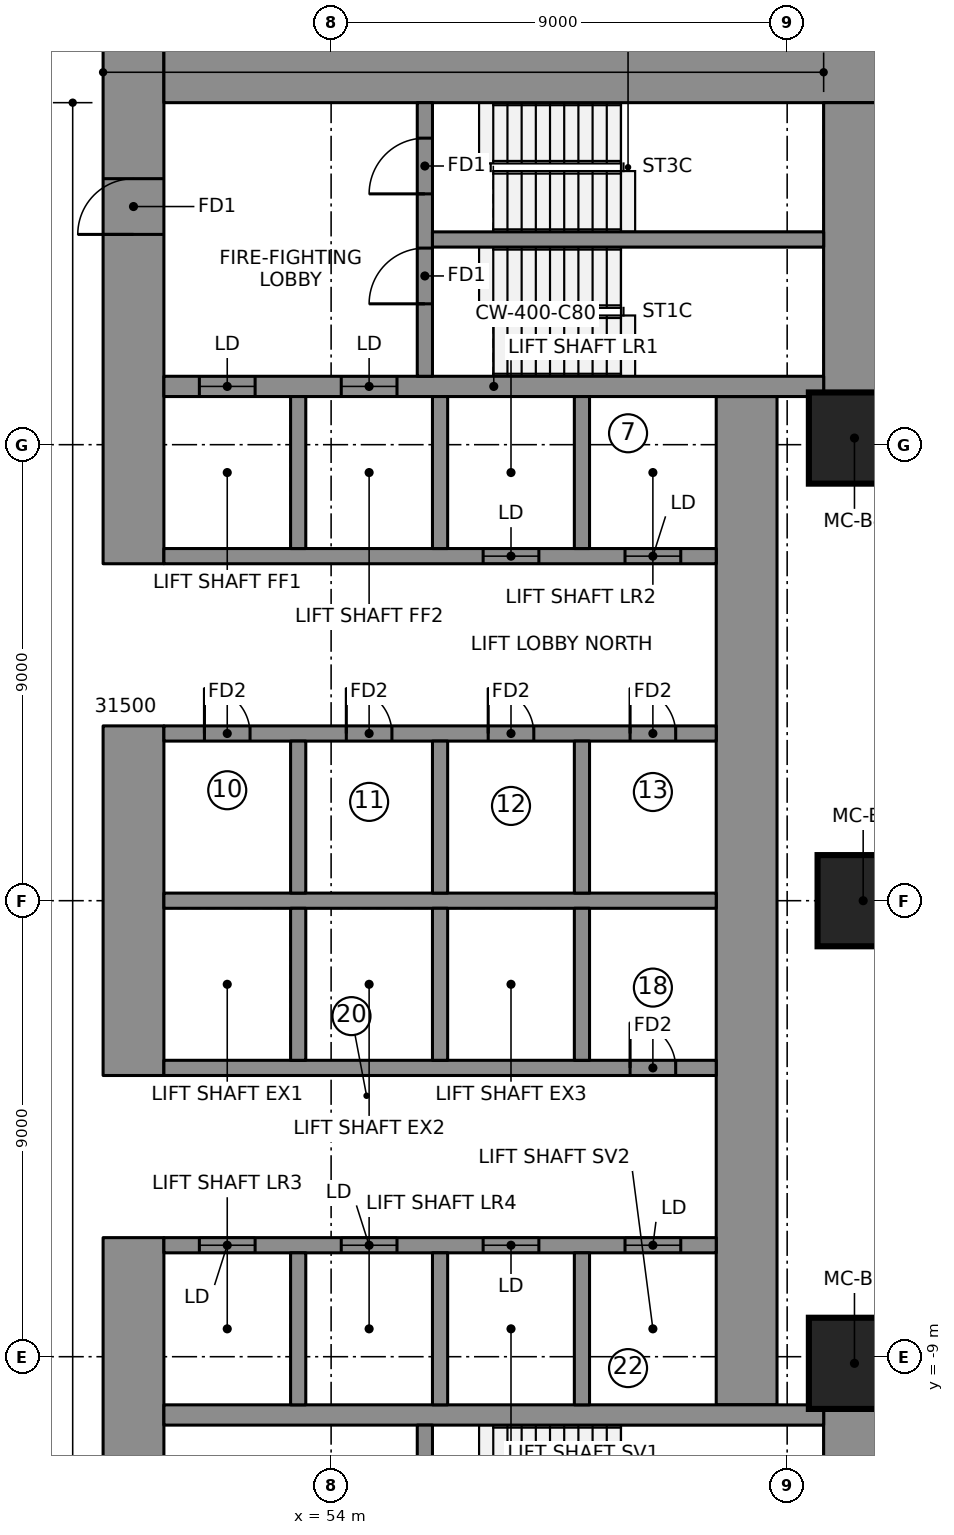
"""IFC4 building model, lengths in metres.
Left out: names, types, materials, properties, quantities, classifications, styles, units other than length and angle.
Written with IfcOpenShell. Run it as: python <this file> out.ifc"""

import sys

from ifc_helpers import new_model, si_unit, direction, frame, frame_2d, origin, origin_2d, place, context, subcontext, project, spatial, rectangle, extrude, element, fill, save


model = new_model("IFC4")
c1 = context("Model", 3, precision=1e-05, world=origin(), true_north=direction((0.0, 1.0)))
c2 = subcontext(c1, "Body", "Model", "MODEL_VIEW")
j1 = project(units=[si_unit("LENGTHUNIT", "METRE"), si_unit("PLANEANGLEUNIT", "RADIAN")], contexts=[c1])
p1 = place(None, origin())
s1 = spatial("IfcSite", under=j1, at=p1, CompositionType="ELEMENT")
p2 = place(p1, origin())
s2 = spatial("IfcBuilding", under=s1, at=p2, CompositionType="ELEMENT")
p3 = place(p2, frame((0.0, 0.0, 57.35)))
s3 = spatial("IfcBuildingStorey", under=s2, at=p3, CompositionType="ELEMENT", Elevation=57.35)
p4 = place(p3, frame((50.1, 6.65, 0.0), z_axis=(0.0, 0.0, 1.0), x_axis=(0.0, 1.0, 0.0)))
e1 = element("IfcWall", 1, at=p4, inside=s3, PredefinedType="SHEAR", context=c2, shape_type="SweptSolid", body=[
    extrude(rectangle(XDim=10.3, YDim=1.2, at=frame_2d((5.15, 0.0))), origin(), (0.0, 0.0, 1.0), 3.55),
])
p5 = place(p4, frame((6.5, 0.0, 0.0)))
e2 = element("IfcOpeningElement", 2, at=p5, cuts=e1, PredefinedType="OPENING", context=c2, shape_type="SweptSolid", body=[
    extrude(rectangle(XDim=1.1, YDim=2.1, at=frame_2d((0.55, 1.05))), frame((0.0, 0.61, 0.0), z_axis=(0.0, -1.0, 0.0), x_axis=(1.0, 0.0, 0.0)), (0.0, 0.0, 1.0), 1.22),
])
p6 = place(p3, frame((50.1, -3.45, 0.0), z_axis=(0.0, 0.0, 1.0), x_axis=(0.0, 1.0, 0.0)))
e3 = element("IfcWall", 3, at=p6, inside=s3, PredefinedType="SHEAR", context=c2, shape_type="SweptSolid", body=[
    extrude(rectangle(XDim=6.9, YDim=1.2, at=frame_2d((3.45, 0.0))), origin(), (0.0, 0.0, 1.0), 3.55),
])
p7 = place(p3, frame((50.1, -16.95, 0.0), z_axis=(0.0, 0.0, 1.0), x_axis=(0.0, 1.0, 0.0)))
e4 = element("IfcWall", 4, at=p7, inside=s3, PredefinedType="SHEAR", context=c2, shape_type="SweptSolid", body=[
    extrude(rectangle(XDim=10.3, YDim=1.2, at=frame_2d((5.15, 0.0))), origin(), (0.0, 0.0, 1.0), 3.55),
])
p8 = place(p7, frame((2.7, 0.0, 0.0)))
e5 = element("IfcOpeningElement", 5, at=p8, cuts=e4, PredefinedType="OPENING", context=c2, shape_type="SweptSolid", body=[
    extrude(rectangle(XDim=1.1, YDim=2.1, at=frame_2d((0.55, 1.05))), frame((0.0, 0.61, 0.0), z_axis=(0.0, -1.0, 0.0), x_axis=(1.0, 0.0, 0.0)), (0.0, 0.0, 1.0), 1.22),
])
p9 = place(p3, frame((50.7, 16.35, 0.0), z_axis=(0.0, 0.0, 1.0), x_axis=(1.0, 0.0, 0.0)))
e6 = element("IfcWall", 6, at=p9, inside=s3, PredefinedType="SHEAR", context=c2, shape_type="SweptSolid", body=[
    extrude(rectangle(XDim=14.22, YDim=1.2, at=frame_2d((7.11, 0.0))), origin(), (0.0, 0.0, 1.0), 3.55),
])
for number, where, z_axis, x_axis in (
    (7, (64.32, 9.95, 0.0), (0.0, 0.0, 1.0), (0.0, 1.0, 0.0)),
    (8, (64.32, -15.75, 0.0), (0.0, 0.0, 1.0), (0.0, 1.0, 0.0)),
):
    element("IfcWall", number, at=place(p3, frame(where, z_axis=z_axis, x_axis=x_axis)), inside=s3, PredefinedType="SHEAR", context=c2, shape_type="SweptSolid", body=[
        extrude(rectangle(XDim=5.8, YDim=1.2, at=frame_2d((2.9, 0.0))), origin(), (0.0, 0.0, 1.0), 3.55),
    ])
p10 = place(p3, frame((62.2, -9.95, 0.0), z_axis=(0.0, 0.0, 1.0), x_axis=(0.0, 1.0, 0.0)))
e9 = element("IfcWall", 9, at=p10, inside=s3, PredefinedType="SHEAR", context=c2, shape_type="SweptSolid", body=[
    extrude(rectangle(XDim=19.9, YDim=1.2, at=frame_2d((9.95, 0.0))), origin(), (0.0, 0.0, 1.0), 3.55),
])
p11 = place(p3, frame((50.7, 10.15, 0.0), z_axis=(0.0, 0.0, 1.0), x_axis=(1.0, 0.0, 0.0)))
e10 = element("IfcWall", 10, at=p11, inside=s3, PredefinedType="SHEAR", context=c2, shape_type="SweptSolid", body=[
    extrude(rectangle(XDim=13.02, YDim=0.4, at=frame_2d((6.51, 0.0))), origin(), (0.0, 0.0, 1.0), 3.55),
])
p12 = place(p11, frame((0.7, 0.0, 0.0)))
e11 = element("IfcOpeningElement", 11, at=p12, cuts=e10, PredefinedType="OPENING", context=c2, shape_type="SweptSolid", body=[
    extrude(rectangle(XDim=1.1, YDim=2.1, at=frame_2d((0.55, 1.05))), frame((0.0, 0.21, 0.0), z_axis=(0.0, -1.0, 0.0), x_axis=(1.0, 0.0, 0.0)), (0.0, 0.0, 1.0), 0.42),
])
p13 = place(p11, frame((3.5, 0.0, 0.0)))
e12 = element("IfcOpeningElement", 12, at=p13, cuts=e10, PredefinedType="OPENING", context=c2, shape_type="SweptSolid", body=[
    extrude(rectangle(XDim=1.1, YDim=2.1, at=frame_2d((0.55, 1.05))), frame((0.0, 0.21, 0.0), z_axis=(0.0, -1.0, 0.0), x_axis=(1.0, 0.0, 0.0)), (0.0, 0.0, 1.0), 0.42),
])
p14 = place(p3, frame((50.7, -10.15, 0.0), z_axis=(0.0, 0.0, 1.0), x_axis=(1.0, 0.0, 0.0)))
e13 = element("IfcWall", 13, at=p14, inside=s3, PredefinedType="SHEAR", context=c2, shape_type="SweptSolid", body=[
    extrude(rectangle(XDim=13.02, YDim=0.4, at=frame_2d((6.51, 0.0))), origin(), (0.0, 0.0, 1.0), 3.55),
])
p15 = place(p3, frame((50.7, 0.0, 0.0), z_axis=(0.0, 0.0, 1.0), x_axis=(1.0, 0.0, 0.0)))
e14 = element("IfcWall", 14, at=p15, inside=s3, PredefinedType="SHEAR", context=c2, shape_type="SweptSolid", body=[
    extrude(rectangle(XDim=10.9, YDim=0.3, at=frame_2d((5.45, 0.0))), origin(), (0.0, 0.0, 1.0), 3.55),
])
p16 = place(p3, frame((50.7, 3.3, 0.0), z_axis=(0.0, 0.0, 1.0), x_axis=(1.0, 0.0, 0.0)))
e15 = element("IfcWall", 15, at=p16, inside=s3, PredefinedType="SHEAR", context=c2, shape_type="SweptSolid", body=[
    extrude(rectangle(XDim=10.9, YDim=0.3, at=frame_2d((5.45, 0.0))), origin(), (0.0, 0.0, 1.0), 3.55),
])
p17 = place(p16, frame((0.8, 0.0, 0.0)))
e16 = element("IfcOpeningElement", 16, at=p17, cuts=e15, PredefinedType="OPENING", context=c2, shape_type="SweptSolid", body=[
    extrude(rectangle(XDim=0.9, YDim=2.1, at=frame_2d((0.45, 1.05))), frame((0.0, 0.16, 0.0), z_axis=(0.0, -1.0, 0.0), x_axis=(1.0, 0.0, 0.0)), (0.0, 0.0, 1.0), 0.32),
])
p18 = place(p16, frame((3.6, 0.0, 0.0)))
e17 = element("IfcOpeningElement", 17, at=p18, cuts=e15, PredefinedType="OPENING", context=c2, shape_type="SweptSolid", body=[
    extrude(rectangle(XDim=0.9, YDim=2.1, at=frame_2d((0.45, 1.05))), frame((0.0, 0.16, 0.0), z_axis=(0.0, -1.0, 0.0), x_axis=(1.0, 0.0, 0.0)), (0.0, 0.0, 1.0), 0.32),
])
p19 = place(p16, frame((6.4, 0.0, 0.0)))
e18 = element("IfcOpeningElement", 18, at=p19, cuts=e15, PredefinedType="OPENING", context=c2, shape_type="SweptSolid", body=[
    extrude(rectangle(XDim=0.9, YDim=2.1, at=frame_2d((0.45, 1.05))), frame((0.0, 0.16, 0.0), z_axis=(0.0, -1.0, 0.0), x_axis=(1.0, 0.0, 0.0)), (0.0, 0.0, 1.0), 0.32),
])
p20 = place(p16, frame((9.2, 0.0, 0.0)))
e19 = element("IfcOpeningElement", 19, at=p20, cuts=e15, PredefinedType="OPENING", context=c2, shape_type="SweptSolid", body=[
    extrude(rectangle(XDim=0.9, YDim=2.1, at=frame_2d((0.45, 1.05))), frame((0.0, 0.16, 0.0), z_axis=(0.0, -1.0, 0.0), x_axis=(1.0, 0.0, 0.0)), (0.0, 0.0, 1.0), 0.32),
])
p21 = place(p3, frame((50.7, 6.8, 0.0), z_axis=(0.0, 0.0, 1.0), x_axis=(1.0, 0.0, 0.0)))
e20 = element("IfcWall", 20, at=p21, inside=s3, PredefinedType="SHEAR", context=c2, shape_type="SweptSolid", body=[
    extrude(rectangle(XDim=10.9, YDim=0.3, at=frame_2d((5.45, 0.0))), origin(), (0.0, 0.0, 1.0), 3.55),
])
p22 = place(p21, frame((6.3, 0.0, 0.0)))
e21 = element("IfcOpeningElement", 21, at=p22, cuts=e20, PredefinedType="OPENING", context=c2, shape_type="SweptSolid", body=[
    extrude(rectangle(XDim=1.1, YDim=2.1, at=frame_2d((0.55, 1.05))), frame((0.0, 0.16, 0.0), z_axis=(0.0, -1.0, 0.0), x_axis=(1.0, 0.0, 0.0)), (0.0, 0.0, 1.0), 0.32),
])
p23 = place(p21, frame((9.1, 0.0, 0.0)))
e22 = element("IfcOpeningElement", 22, at=p23, cuts=e20, PredefinedType="OPENING", context=c2, shape_type="SweptSolid", body=[
    extrude(rectangle(XDim=1.1, YDim=2.1, at=frame_2d((0.55, 1.05))), frame((0.0, 0.16, 0.0), z_axis=(0.0, -1.0, 0.0), x_axis=(1.0, 0.0, 0.0)), (0.0, 0.0, 1.0), 0.32),
])
for number, where, z_axis, x_axis in (
    (23, (53.35, 0.15, 0.0), (0.0, 0.0, 1.0), (0.0, 1.0, 0.0)),
    (24, (53.35, 6.95, 0.0), (0.0, 0.0, 1.0), (0.0, 1.0, 0.0)),
    (25, (56.15, 0.15, 0.0), (0.0, 0.0, 1.0), (0.0, 1.0, 0.0)),
    (26, (56.15, 6.95, 0.0), (0.0, 0.0, 1.0), (0.0, 1.0, 0.0)),
    (27, (58.95, 0.15, 0.0), (0.0, 0.0, 1.0), (0.0, 1.0, 0.0)),
    (28, (58.95, 6.95, 0.0), (0.0, 0.0, 1.0), (0.0, 1.0, 0.0)),
):
    element("IfcWall", number, at=place(p3, frame(where, z_axis=z_axis, x_axis=x_axis)), inside=s3, PredefinedType="SHEAR", context=c2, shape_type="SweptSolid", body=[
        extrude(rectangle(XDim=3.0, YDim=0.3, at=frame_2d((1.5, 0.0))), origin(), (0.0, 0.0, 1.0), 3.55),
    ])
p24 = place(p3, frame((50.7, -3.3, 0.0), z_axis=(0.0, 0.0, 1.0), x_axis=(1.0, 0.0, 0.0)))
e29 = element("IfcWall", 29, at=p24, inside=s3, PredefinedType="SHEAR", context=c2, shape_type="SweptSolid", body=[
    extrude(rectangle(XDim=10.9, YDim=0.3, at=frame_2d((5.45, 0.0))), origin(), (0.0, 0.0, 1.0), 3.55),
])
p25 = place(p24, frame((9.2, 0.0, 0.0)))
e30 = element("IfcOpeningElement", 30, at=p25, cuts=e29, PredefinedType="OPENING", context=c2, shape_type="SweptSolid", body=[
    extrude(rectangle(XDim=0.9, YDim=2.1, at=frame_2d((0.45, 1.05))), frame((0.0, 0.16, 0.0), z_axis=(0.0, -1.0, 0.0), x_axis=(1.0, 0.0, 0.0)), (0.0, 0.0, 1.0), 0.32),
])
p26 = place(p3, frame((50.7, -6.8, 0.0), z_axis=(0.0, 0.0, 1.0), x_axis=(1.0, 0.0, 0.0)))
e31 = element("IfcWall", 31, at=p26, inside=s3, PredefinedType="SHEAR", context=c2, shape_type="SweptSolid", body=[
    extrude(rectangle(XDim=10.9, YDim=0.3, at=frame_2d((5.45, 0.0))), origin(), (0.0, 0.0, 1.0), 3.55),
])
p27 = place(p26, frame((0.7, 0.0, 0.0)))
e32 = element("IfcOpeningElement", 32, at=p27, cuts=e31, PredefinedType="OPENING", context=c2, shape_type="SweptSolid", body=[
    extrude(rectangle(XDim=1.1, YDim=2.1, at=frame_2d((0.55, 1.05))), frame((0.0, 0.16, 0.0), z_axis=(0.0, -1.0, 0.0), x_axis=(1.0, 0.0, 0.0)), (0.0, 0.0, 1.0), 0.32),
])
p28 = place(p26, frame((3.5, 0.0, 0.0)))
e33 = element("IfcOpeningElement", 33, at=p28, cuts=e31, PredefinedType="OPENING", context=c2, shape_type="SweptSolid", body=[
    extrude(rectangle(XDim=1.1, YDim=2.1, at=frame_2d((0.55, 1.05))), frame((0.0, 0.16, 0.0), z_axis=(0.0, -1.0, 0.0), x_axis=(1.0, 0.0, 0.0)), (0.0, 0.0, 1.0), 0.32),
])
p29 = place(p26, frame((6.3, 0.0, 0.0)))
e34 = element("IfcOpeningElement", 34, at=p29, cuts=e31, PredefinedType="OPENING", context=c2, shape_type="SweptSolid", body=[
    extrude(rectangle(XDim=1.1, YDim=2.1, at=frame_2d((0.55, 1.05))), frame((0.0, 0.16, 0.0), z_axis=(0.0, -1.0, 0.0), x_axis=(1.0, 0.0, 0.0)), (0.0, 0.0, 1.0), 0.32),
])
p30 = place(p26, frame((9.1, 0.0, 0.0)))
e35 = element("IfcOpeningElement", 35, at=p30, cuts=e31, PredefinedType="OPENING", context=c2, shape_type="SweptSolid", body=[
    extrude(rectangle(XDim=1.1, YDim=2.1, at=frame_2d((0.55, 1.05))), frame((0.0, 0.16, 0.0), z_axis=(0.0, -1.0, 0.0), x_axis=(1.0, 0.0, 0.0)), (0.0, 0.0, 1.0), 0.32),
])
for number, where, z_axis, x_axis in (
    (36, (53.35, -3.15, 0.0), (0.0, 0.0, 1.0), (0.0, 1.0, 0.0)),
    (37, (53.35, -9.95, 0.0), (0.0, 0.0, 1.0), (0.0, 1.0, 0.0)),
    (38, (56.15, -3.15, 0.0), (0.0, 0.0, 1.0), (0.0, 1.0, 0.0)),
    (39, (56.15, -9.95, 0.0), (0.0, 0.0, 1.0), (0.0, 1.0, 0.0)),
    (40, (58.95, -3.15, 0.0), (0.0, 0.0, 1.0), (0.0, 1.0, 0.0)),
    (41, (58.95, -9.95, 0.0), (0.0, 0.0, 1.0), (0.0, 1.0, 0.0)),
):
    element("IfcWall", number, at=place(p3, frame(where, z_axis=z_axis, x_axis=x_axis)), inside=s3, PredefinedType="SHEAR", context=c2, shape_type="SweptSolid", body=[
        extrude(rectangle(XDim=3.0, YDim=0.3, at=frame_2d((1.5, 0.0))), origin(), (0.0, 0.0, 1.0), 3.55),
    ])
p31 = place(p3, frame((55.85, 10.35, 0.0), z_axis=(0.0, 0.0, 1.0), x_axis=(0.0, 1.0, 0.0)))
e42 = element("IfcWall", 42, at=p31, inside=s3, PredefinedType="SHEAR", context=c2, shape_type="SweptSolid", body=[
    extrude(rectangle(XDim=5.4, YDim=0.3, at=frame_2d((2.7, 0.0))), origin(), (0.0, 0.0, 1.0), 3.55),
])
p32 = place(p31, frame((1.43, 0.0, 0.0)))
e43 = element("IfcOpeningElement", 43, at=p32, cuts=e42, PredefinedType="OPENING", context=c2, shape_type="SweptSolid", body=[
    extrude(rectangle(XDim=1.1, YDim=2.1, at=frame_2d((0.55, 1.05))), frame((0.0, 0.16, 0.0), z_axis=(0.0, -1.0, 0.0), x_axis=(1.0, 0.0, 0.0)), (0.0, 0.0, 1.0), 0.32),
])
p33 = place(p31, frame((3.6, 0.0, 0.0)))
e44 = element("IfcOpeningElement", 44, at=p33, cuts=e42, PredefinedType="OPENING", context=c2, shape_type="SweptSolid", body=[
    extrude(rectangle(XDim=1.1, YDim=2.1, at=frame_2d((0.55, 1.05))), frame((0.0, 0.16, 0.0), z_axis=(0.0, -1.0, 0.0), x_axis=(1.0, 0.0, 0.0)), (0.0, 0.0, 1.0), 0.32),
])
p34 = place(p3, frame((55.85, -15.75, 0.0), z_axis=(0.0, 0.0, 1.0), x_axis=(0.0, 1.0, 0.0)))
e45 = element("IfcWall", 45, at=p34, inside=s3, PredefinedType="SHEAR", context=c2, shape_type="SweptSolid", body=[
    extrude(rectangle(XDim=5.4, YDim=0.3, at=frame_2d((2.7, 0.0))), origin(), (0.0, 0.0, 1.0), 3.55),
])
p35 = place(p34, frame((3.6, 0.0, 0.0)))
e46 = element("IfcOpeningElement", 46, at=p35, cuts=e45, PredefinedType="OPENING", context=c2, shape_type="SweptSolid", body=[
    extrude(rectangle(XDim=1.1, YDim=2.1, at=frame_2d((0.55, 1.05))), frame((0.0, 0.16, 0.0), z_axis=(0.0, -1.0, 0.0), x_axis=(1.0, 0.0, 0.0)), (0.0, 0.0, 1.0), 0.32),
])
p36 = place(p34, frame((0.8, 0.0, 0.0)))
e47 = element("IfcOpeningElement", 47, at=p36, cuts=e45, PredefinedType="OPENING", context=c2, shape_type="SweptSolid", body=[
    extrude(rectangle(XDim=0.9, YDim=2.1, at=frame_2d((0.45, 1.05))), frame((0.0, 0.16, 0.0), z_axis=(0.0, -1.0, 0.0), x_axis=(1.0, 0.0, 0.0)), (0.0, 0.0, 1.0), 0.32),
])
p37 = place(p3, frame((56.0, 13.05, 0.0), z_axis=(0.0, 0.0, 1.0), x_axis=(1.0, 0.0, 0.0)))
e48 = element("IfcWall", 48, at=p37, inside=s3, PredefinedType="SHEAR", context=c2, shape_type="SweptSolid", body=[
    extrude(rectangle(XDim=7.72, YDim=0.3, at=frame_2d((3.86, 0.0))), origin(), (0.0, 0.0, 1.0), 3.55),
])
for number, where, z_axis, x_axis in (
    (49, (64.328, -9.131, 0.0), (0.0, 0.0, 1.0), (1.0, 0.0, 0.0)),
    (50, (64.5, 0.0, 0.0), (0.0, 0.0, 1.0), (1.0, 0.0, 0.0)),
    (51, (64.328, 9.131, 0.0), (0.0, 0.0, 1.0), (1.0, 0.0, 0.0)),
):
    element("IfcColumn", number, at=place(p3, frame(where, z_axis=z_axis, x_axis=x_axis)), inside=s3, PredefinedType="COLUMN", context=c2, shape_type="SweptSolid", body=[
        extrude(rectangle(XDim=1.8, YDim=1.8, at=origin_2d()), origin(), (0.0, 0.0, 1.0), 3.55),
    ])
p38 = place(p12, origin())
e52 = element("IfcDoor", 52, at=p38, inside=s3, OperationType="DOUBLE_DOOR_SLIDING", PredefinedType="DOOR", context=c2, shape_type="SweptSolid", body=[
    extrude(rectangle(XDim=1.1, YDim=2.1, at=frame_2d((0.55, 1.05))), frame((0.0, 0.025, 0.0), z_axis=(0.0, -1.0, 0.0), x_axis=(1.0, 0.0, 0.0)), (0.0, 0.0, 1.0), 0.05),
])
fill(e11, e52)
p39 = place(p13, origin())
e53 = element("IfcDoor", 53, at=p39, inside=s3, OperationType="DOUBLE_DOOR_SLIDING", PredefinedType="DOOR", context=c2, shape_type="SweptSolid", body=[
    extrude(rectangle(XDim=1.1, YDim=2.1, at=frame_2d((0.55, 1.05))), frame((0.0, 0.025, 0.0), z_axis=(0.0, -1.0, 0.0), x_axis=(1.0, 0.0, 0.0)), (0.0, 0.0, 1.0), 0.05),
])
fill(e12, e53)
p40 = place(p22, origin())
e54 = element("IfcDoor", 54, at=p40, inside=s3, OperationType="DOUBLE_DOOR_SLIDING", PredefinedType="DOOR", context=c2, shape_type="SweptSolid", body=[
    extrude(rectangle(XDim=1.1, YDim=2.1, at=frame_2d((0.55, 1.05))), frame((0.0, 0.025, 0.0), z_axis=(0.0, -1.0, 0.0), x_axis=(1.0, 0.0, 0.0)), (0.0, 0.0, 1.0), 0.05),
])
fill(e21, e54)
p41 = place(p23, origin())
e55 = element("IfcDoor", 55, at=p41, inside=s3, OperationType="DOUBLE_DOOR_SLIDING", PredefinedType="DOOR", context=c2, shape_type="SweptSolid", body=[
    extrude(rectangle(XDim=1.1, YDim=2.1, at=frame_2d((0.55, 1.05))), frame((0.0, 0.025, 0.0), z_axis=(0.0, -1.0, 0.0), x_axis=(1.0, 0.0, 0.0)), (0.0, 0.0, 1.0), 0.05),
])
fill(e22, e55)
p42 = place(p27, origin())
e56 = element("IfcDoor", 56, at=p42, inside=s3, OperationType="DOUBLE_DOOR_SLIDING", PredefinedType="DOOR", context=c2, shape_type="SweptSolid", body=[
    extrude(rectangle(XDim=1.1, YDim=2.1, at=frame_2d((0.55, 1.05))), frame((0.0, 0.025, 0.0), z_axis=(0.0, -1.0, 0.0), x_axis=(1.0, 0.0, 0.0)), (0.0, 0.0, 1.0), 0.05),
])
fill(e32, e56)
p43 = place(p28, origin())
e57 = element("IfcDoor", 57, at=p43, inside=s3, OperationType="DOUBLE_DOOR_SLIDING", PredefinedType="DOOR", context=c2, shape_type="SweptSolid", body=[
    extrude(rectangle(XDim=1.1, YDim=2.1, at=frame_2d((0.55, 1.05))), frame((0.0, 0.025, 0.0), z_axis=(0.0, -1.0, 0.0), x_axis=(1.0, 0.0, 0.0)), (0.0, 0.0, 1.0), 0.05),
])
fill(e33, e57)
p44 = place(p29, origin())
e58 = element("IfcDoor", 58, at=p44, inside=s3, OperationType="DOUBLE_DOOR_SLIDING", PredefinedType="DOOR", context=c2, shape_type="SweptSolid", body=[
    extrude(rectangle(XDim=1.1, YDim=2.1, at=frame_2d((0.55, 1.05))), frame((0.0, 0.025, 0.0), z_axis=(0.0, -1.0, 0.0), x_axis=(1.0, 0.0, 0.0)), (0.0, 0.0, 1.0), 0.05),
])
fill(e34, e58)
p45 = place(p30, origin())
e59 = element("IfcDoor", 59, at=p45, inside=s3, OperationType="DOUBLE_DOOR_SLIDING", PredefinedType="DOOR", context=c2, shape_type="SweptSolid", body=[
    extrude(rectangle(XDim=1.1, YDim=2.1, at=frame_2d((0.55, 1.05))), frame((0.0, 0.025, 0.0), z_axis=(0.0, -1.0, 0.0), x_axis=(1.0, 0.0, 0.0)), (0.0, 0.0, 1.0), 0.05),
])
fill(e35, e59)
p46 = place(p32, origin())
e60 = element("IfcDoor", 60, at=p46, inside=s3, OperationType="SINGLE_SWING_RIGHT", PredefinedType="DOOR", context=c2, shape_type="SweptSolid", body=[
    extrude(rectangle(XDim=1.1, YDim=2.1, at=frame_2d((0.55, 1.05))), frame((0.0, 0.025, 0.0), z_axis=(0.0, -1.0, 0.0), x_axis=(1.0, 0.0, 0.0)), (0.0, 0.0, 1.0), 0.05),
])
fill(e43, e60)
p47 = place(p33, origin())
e61 = element("IfcDoor", 61, at=p47, inside=s3, OperationType="SINGLE_SWING_RIGHT", PredefinedType="DOOR", context=c2, shape_type="SweptSolid", body=[
    extrude(rectangle(XDim=1.1, YDim=2.1, at=frame_2d((0.55, 1.05))), frame((0.0, 0.025, 0.0), z_axis=(0.0, -1.0, 0.0), x_axis=(1.0, 0.0, 0.0)), (0.0, 0.0, 1.0), 0.05),
])
fill(e44, e61)
p48 = place(p5, origin())
e62 = element("IfcDoor", 62, at=p48, inside=s3, OperationType="SINGLE_SWING_RIGHT", PredefinedType="DOOR", context=c2, shape_type="SweptSolid", body=[
    extrude(rectangle(XDim=1.1, YDim=2.1, at=frame_2d((0.55, 1.05))), frame((0.0, 0.025, 0.0), z_axis=(0.0, -1.0, 0.0), x_axis=(1.0, 0.0, 0.0)), (0.0, 0.0, 1.0), 0.05),
])
fill(e2, e62)
p49 = place(p17, origin())
e63 = element("IfcDoor", 63, at=p49, inside=s3, OperationType="SINGLE_SWING_LEFT", PredefinedType="DOOR", context=c2, shape_type="SweptSolid", body=[
    extrude(rectangle(XDim=0.9, YDim=2.1, at=frame_2d((0.45, 1.05))), frame((0.0, 0.025, 0.0), z_axis=(0.0, -1.0, 0.0), x_axis=(1.0, 0.0, 0.0)), (0.0, 0.0, 1.0), 0.05),
])
fill(e16, e63)
p50 = place(p18, origin())
e64 = element("IfcDoor", 64, at=p50, inside=s3, OperationType="SINGLE_SWING_LEFT", PredefinedType="DOOR", context=c2, shape_type="SweptSolid", body=[
    extrude(rectangle(XDim=0.9, YDim=2.1, at=frame_2d((0.45, 1.05))), frame((0.0, 0.025, 0.0), z_axis=(0.0, -1.0, 0.0), x_axis=(1.0, 0.0, 0.0)), (0.0, 0.0, 1.0), 0.05),
])
fill(e17, e64)
p51 = place(p19, origin())
e65 = element("IfcDoor", 65, at=p51, inside=s3, OperationType="SINGLE_SWING_LEFT", PredefinedType="DOOR", context=c2, shape_type="SweptSolid", body=[
    extrude(rectangle(XDim=0.9, YDim=2.1, at=frame_2d((0.45, 1.05))), frame((0.0, 0.025, 0.0), z_axis=(0.0, -1.0, 0.0), x_axis=(1.0, 0.0, 0.0)), (0.0, 0.0, 1.0), 0.05),
])
fill(e18, e65)
p52 = place(p20, origin())
e66 = element("IfcDoor", 66, at=p52, inside=s3, OperationType="SINGLE_SWING_LEFT", PredefinedType="DOOR", context=c2, shape_type="SweptSolid", body=[
    extrude(rectangle(XDim=0.9, YDim=2.1, at=frame_2d((0.45, 1.05))), frame((0.0, 0.025, 0.0), z_axis=(0.0, -1.0, 0.0), x_axis=(1.0, 0.0, 0.0)), (0.0, 0.0, 1.0), 0.05),
])
fill(e19, e66)
p53 = place(p25, origin())
e67 = element("IfcDoor", 67, at=p53, inside=s3, OperationType="SINGLE_SWING_LEFT", PredefinedType="DOOR", context=c2, shape_type="SweptSolid", body=[
    extrude(rectangle(XDim=0.9, YDim=2.1, at=frame_2d((0.45, 1.05))), frame((0.0, 0.025, 0.0), z_axis=(0.0, -1.0, 0.0), x_axis=(1.0, 0.0, 0.0)), (0.0, 0.0, 1.0), 0.05),
])
fill(e30, e67)
save(model, sys.argv[1])
